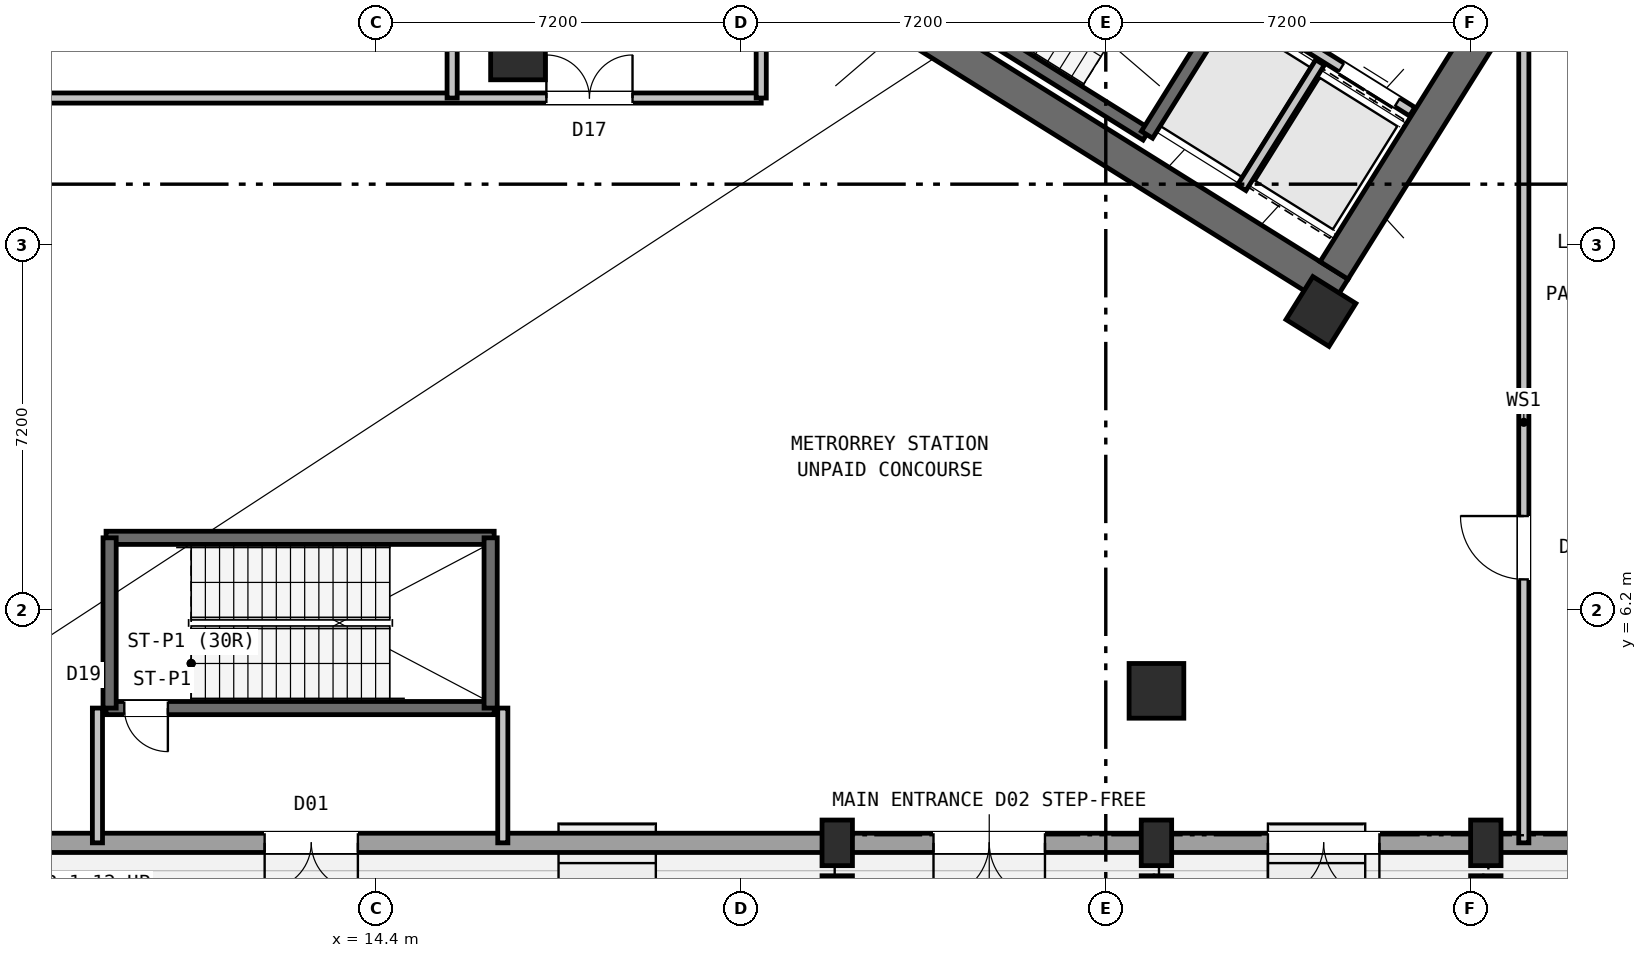
"""IFC4 building model, lengths in metres.
Left out: names, types, materials, properties, quantities, classifications, styles, units other than length and angle.
Written with IfcOpenShell. Run it as: python <this file> out.ifc"""

import sys

from ifc_helpers import new_model, si_unit, direction, frame, frame_2d, origin, origin_2d, place, context, subcontext, project, spatial, rectangle, hollow_rectangle, extrude, source, transform, mapped, element, fill, save


model = new_model("IFC4")
c1 = context("Model", 3, precision=1e-05, world=origin(), true_north=direction((0.0, 1.0)))
c2 = subcontext(c1, "Body", "Model", "MODEL_VIEW")
j1 = project(units=[si_unit("LENGTHUNIT", "METRE"), si_unit("PLANEANGLEUNIT", "RADIAN")], contexts=[c1])
p1 = place(None, origin())
s1 = spatial("IfcSite", under=j1, at=p1, CompositionType="ELEMENT")
p2 = place(p1, origin())
s2 = spatial("IfcBuilding", under=s1, at=p2, CompositionType="ELEMENT")
p3 = place(p2, origin())
s3 = spatial("IfcBuildingStorey", under=s2, at=p3, CompositionType="ELEMENT", Elevation=0.0)
p4 = place(p3, frame((33.409, 12.45, 0.0), z_axis=(0.0, 0.0, 1.0), x_axis=(-0.848051132073, 0.529914405721, 0.0)))
e1 = element("IfcWall", 1, at=p4, inside=s3, PredefinedType="SHEAR", context=c2, shape_type="SweptSolid", body=[
    extrude(rectangle(XDim=13.24, YDim=0.65, at=frame_2d((6.62, 0.0))), origin(), (0.0, 0.0, 1.0), 5.05),
])
p5 = place(p3, frame((36.683, 18.304, 0.0), z_axis=(0.0, 0.0, 1.0), x_axis=(-0.529899109053, -0.848060690178, 0.0)))
e2 = element("IfcWall", 2, at=p5, inside=s3, PredefinedType="SHEAR", context=c2, shape_type="SweptSolid", body=[
    extrude(rectangle(XDim=6.375, YDim=0.65, at=frame_2d((3.188, 0.0))), origin(), (0.0, 0.0, 1.0), 5.05),
])
m1 = source(origin(), c2, "Body", "SweptSolid", [
    extrude(hollow_rectangle(XDim=1.08, YDim=1.08, WallThickness=0.04, at=origin_2d()), origin(), (0.0, 0.0, 1.0), 5.4),
])
for number, where, z_axis, x_axis in (
    (3, (17.2, 17.2, 0.0), (0.0, 0.0, 1.0), (1.0, 0.0, 0.0)),
    (4, (29.8, 4.6, 0.0), (0.0, 0.0, 1.0), (1.0, 0.0, 0.0)),
):
    element("IfcColumn", number, at=place(p3, frame(where, z_axis=z_axis, x_axis=x_axis)), inside=s3, PredefinedType="COLUMN", context=c2, shape_type="MappedRepresentation", body=[
        mapped(m1, transform((0.0, 0.0, 0.0), scale=1.0)),
    ])
m2 = source(origin(), c2, "Body", "SweptSolid", [
    extrude(hollow_rectangle(XDim=1.0, YDim=1.0, WallThickness=0.04, at=origin_2d()), origin(), (0.0, 0.0, 1.0), 5.4),
])
p6 = place(p3, frame((33.046, 12.087, 0.0), z_axis=(0.0, 0.0, 1.0), x_axis=(-0.848048096156, 0.529919264233, 0.0)))
e5 = element("IfcColumn", 5, at=p6, inside=s3, PredefinedType="COLUMN", context=c2, shape_type="MappedRepresentation", body=[
    mapped(m2, transform((0.0, 0.0, 0.0), scale=1.0)),
])
m3 = source(origin(), c2, "Body", "SweptSolid", [
    extrude(rectangle(XDim=0.6, YDim=0.9, at=origin_2d()), origin(), (0.0, 0.0, 1.0), 4.34),
])
p7 = place(p3, frame((23.5, 0.5, -0.16), z_axis=(0.0, 0.0, 1.0), x_axis=(1.0, 0.0, 0.0)))
e6 = element("IfcColumn", 6, at=p7, inside=s3, PredefinedType="PILASTER", context=c2, shape_type="MappedRepresentation", body=[
    mapped(m3, transform((0.0, 0.0, 0.0), scale=1.0)),
])
m4 = source(origin(), c2, "Body", "SweptSolid", [
    extrude(rectangle(XDim=0.6, YDim=0.9, at=origin_2d()), origin(), (0.0, 0.0, 1.0), 4.53),
])
p8 = place(p3, frame((23.5, 1.6, -0.35), z_axis=(0.0, 0.0, 1.0), x_axis=(1.0, 0.0, 0.0)))
e7 = element("IfcColumn", 7, at=p8, inside=s3, PredefinedType="PILASTER", context=c2, shape_type="MappedRepresentation", body=[
    mapped(m4, transform((0.0, 0.0, 0.0), scale=1.0)),
])
p9 = place(p3, frame((29.8, 0.5, -0.16), z_axis=(0.0, 0.0, 1.0), x_axis=(1.0, 0.0, 0.0)))
e8 = element("IfcColumn", 8, at=p9, inside=s3, PredefinedType="PILASTER", context=c2, shape_type="MappedRepresentation", body=[
    mapped(m3, transform((0.0, 0.0, 0.0), scale=1.0)),
])
p10 = place(p3, frame((29.8, 1.6, -0.35), z_axis=(0.0, 0.0, 1.0), x_axis=(1.0, 0.0, 0.0)))
e9 = element("IfcColumn", 9, at=p10, inside=s3, PredefinedType="PILASTER", context=c2, shape_type="MappedRepresentation", body=[
    mapped(m4, transform((0.0, 0.0, 0.0), scale=1.0)),
])
p11 = place(p3, frame((36.3, 0.5, -0.16), z_axis=(0.0, 0.0, 1.0), x_axis=(1.0, 0.0, 0.0)))
e10 = element("IfcColumn", 10, at=p11, inside=s3, PredefinedType="PILASTER", context=c2, shape_type="MappedRepresentation", body=[
    mapped(m3, transform((0.0, 0.0, 0.0), scale=1.0)),
])
p12 = place(p3, frame((36.3, 1.6, -0.35), z_axis=(0.0, 0.0, 1.0), x_axis=(1.0, 0.0, 0.0)))
e11 = element("IfcColumn", 11, at=p12, inside=s3, PredefinedType="PILASTER", context=c2, shape_type="MappedRepresentation", body=[
    mapped(m4, transform((0.0, 0.0, 0.0), scale=1.0)),
])
p13 = place(p3, frame((67.117, 1.6, 0.0), z_axis=(0.0, 0.0, 1.0), x_axis=(-1.0, 0.0, 0.0)))
e12 = element("IfcWall", 12, at=p13, inside=s3, PredefinedType="STANDARD", context=c2, shape_type="SweptSolid", body=[
    extrude(rectangle(XDim=62.234, YDim=0.38, at=frame_2d((31.117, 0.0))), origin(), (0.0, 0.0, 1.0), 3.755),
])
p14 = place(p13, frame((53.077, 0.0, 0.0)))
e13 = element("IfcOpeningElement", 13, at=p14, cuts=e12, PredefinedType="OPENING", context=c2, shape_type="SweptSolid", body=[
    extrude(rectangle(XDim=1.84, YDim=2.4, at=frame_2d((0.92, 1.2))), frame((0.0, 0.2, 0.0), z_axis=(0.0, -1.0, 0.0), x_axis=(1.0, 0.0, 0.0)), (0.0, 0.0, 1.0), 0.4),
])
p15 = place(p13, frame((39.517, 0.0, 0.0)))
e14 = element("IfcOpeningElement", 14, at=p15, cuts=e12, PredefinedType="OPENING", context=c2, shape_type="SweptSolid", body=[
    extrude(rectangle(XDim=2.2, YDim=2.6, at=frame_2d((1.1, 1.3))), frame((0.0, 0.2, 0.0), z_axis=(0.0, -1.0, 0.0), x_axis=(1.0, 0.0, 0.0)), (0.0, 0.0, 1.0), 0.4),
])
p16 = place(p13, frame((32.917, 0.0, 0.0)))
e15 = element("IfcOpeningElement", 15, at=p16, cuts=e12, PredefinedType="OPENING", context=c2, shape_type="SweptSolid", body=[
    extrude(rectangle(XDim=2.2, YDim=2.6, at=frame_2d((1.1, 1.3))), frame((0.0, 0.2, 0.0), z_axis=(0.0, -1.0, 0.0), x_axis=(1.0, 0.0, 0.0)), (0.0, 0.0, 1.0), 0.4),
])
p17 = place(p13, frame((26.997, 0.0, 0.0)))
e16 = element("IfcOpeningElement", 16, at=p17, cuts=e12, PredefinedType="OPENING", context=c2, shape_type="SweptSolid", body=[
    extrude(rectangle(XDim=1.84, YDim=2.4, at=frame_2d((0.92, 1.2))), frame((0.0, 0.2, 0.0), z_axis=(0.0, -1.0, 0.0), x_axis=(1.0, 0.0, 0.0)), (0.0, 0.0, 1.0), 0.4),
])
p18 = place(p13, frame((21.017, 0.0, 0.0)))
e17 = element("IfcOpeningElement", 17, at=p18, cuts=e12, PredefinedType="OPENING", context=c2, shape_type="SweptSolid", body=[
    extrude(rectangle(XDim=2.2, YDim=2.6, at=frame_2d((1.1, 1.3))), frame((0.0, 0.2, 0.0), z_axis=(0.0, -1.0, 0.0), x_axis=(1.0, 0.0, 0.0)), (0.0, 0.0, 1.0), 0.4),
])
p19 = place(p13, frame((17.297, 0.0, 0.0)))
e18 = element("IfcOpeningElement", 18, at=p19, cuts=e12, PredefinedType="OPENING", context=c2, shape_type="SweptSolid", body=[
    extrude(rectangle(XDim=1.84, YDim=2.4, at=frame_2d((0.92, 1.2))), frame((0.0, 0.2, 0.0), z_axis=(0.0, -1.0, 0.0), x_axis=(1.0, 0.0, 0.0)), (0.0, 0.0, 1.0), 0.4),
])
p20 = place(p13, frame((12.567, 0.0, 0.0)))
e19 = element("IfcOpeningElement", 19, at=p20, cuts=e12, PredefinedType="OPENING", context=c2, shape_type="SweptSolid", body=[
    extrude(rectangle(XDim=2.2, YDim=2.6, at=frame_2d((1.1, 1.3))), frame((0.0, 0.2, 0.0), z_axis=(0.0, -1.0, 0.0), x_axis=(1.0, 0.0, 0.0)), (0.0, 0.0, 1.0), 0.4),
])
p21 = place(p13, frame((6.277, 0.0, 0.0)))
e20 = element("IfcOpeningElement", 20, at=p21, cuts=e12, PredefinedType="OPENING", context=c2, shape_type="SweptSolid", body=[
    extrude(rectangle(XDim=1.84, YDim=2.4, at=frame_2d((0.92, 1.2))), frame((0.0, 0.2, 0.0), z_axis=(0.0, -1.0, 0.0), x_axis=(1.0, 0.0, 0.0)), (0.0, 0.0, 1.0), 0.4),
])
p22 = place(p3, frame((29.605, 15.581, 0.0), z_axis=(0.0, 0.0, 1.0), x_axis=(-0.848036911448, 0.529937163087, 0.0)))
e21 = element("IfcWall", 21, at=p22, inside=s3, PredefinedType="SHEAR", context=c2, shape_type="SweptSolid", body=[
    extrude(rectangle(XDim=7.46, YDim=0.26, at=frame_2d((3.73, 0.0))), origin(), (0.0, 0.0, 1.0), 5.05),
])
p23 = place(p3, frame((31.288, 18.256, 0.0), z_axis=(0.0, 0.0, 1.0), x_axis=(-0.529943379326, -0.848033026897, 0.0)))
e22 = element("IfcWall", 22, at=p23, inside=s3, PredefinedType="SHEAR", context=c2, shape_type="SweptSolid", body=[
    extrude(rectangle(XDim=3.16, YDim=0.26, at=frame_2d((1.58, 0.0))), origin(), (0.0, 0.0, 1.0), 5.05),
])
p24 = place(p3, frame((34.848, 16.031, 0.0), z_axis=(0.0, 0.0, 1.0), x_axis=(-0.848044042236, 0.529925751807, 0.0)))
e23 = element("IfcWall", 23, at=p24, inside=s3, PredefinedType="STANDARD", context=c2, shape_type="SweptSolid", body=[
    extrude(rectangle(XDim=4.198, YDim=0.2, at=frame_2d((2.099, 0.0))), origin(), (0.0, 0.0, 1.0), 5.04),
])
p25 = place(p24, frame((0.348, 0.0, 0.0)))
e24 = element("IfcOpeningElement", 24, at=p25, cuts=e23, PredefinedType="OPENING", context=c2, shape_type="SweptSolid", body=[
    extrude(rectangle(XDim=1.3, YDim=2.2, at=frame_2d((0.65, 1.1))), frame((0.0, 0.11, 0.0), z_axis=(0.0, -1.0, 0.0), x_axis=(1.0, 0.0, 0.0)), (0.0, 0.0, 1.0), 0.22),
])
p26 = place(p24, frame((2.423, 0.0, 0.0)))
e25 = element("IfcOpeningElement", 25, at=p26, cuts=e23, PredefinedType="OPENING", context=c2, shape_type="SweptSolid", body=[
    extrude(rectangle(XDim=1.45, YDim=2.25, at=frame_2d((0.725, 1.125))), frame((0.0, 0.11, 0.0), z_axis=(0.0, -1.0, 0.0), x_axis=(1.0, 0.0, 0.0)), (0.0, 0.0, 1.0), 0.22),
])
p27 = place(p3, frame((33.029, 17.003, 0.0), z_axis=(0.0, 0.0, 1.0), x_axis=(-0.529916267533, -0.848049968695, 0.0)))
e26 = element("IfcWall", 26, at=p27, inside=s3, PredefinedType="STANDARD", context=c2, shape_type="SweptSolid", body=[
    extrude(rectangle(XDim=2.92, YDim=0.2, at=frame_2d((1.46, 0.0))), origin(), (0.0, 0.0, 1.0), 5.04),
])
p28 = place(p3, frame((9.07, 7.62, 0.0), z_axis=(0.0, 0.0, 1.0), x_axis=(1.0, 0.0, 0.0)))
e27 = element("IfcWall", 27, at=p28, inside=s3, PredefinedType="SHEAR", context=c2, shape_type="SweptSolid", body=[
    extrude(rectangle(XDim=7.66, YDim=0.26, at=frame_2d((3.83, 0.0))), origin(), (0.0, 0.0, 1.0), 5.2),
])
p29 = place(p3, frame((9.07, 4.26, 0.0), z_axis=(0.0, 0.0, 1.0), x_axis=(1.0, 0.0, 0.0)))
e28 = element("IfcWall", 28, at=p29, inside=s3, PredefinedType="SHEAR", context=c2, shape_type="SweptSolid", body=[
    extrude(rectangle(XDim=7.66, YDim=0.26, at=frame_2d((3.83, 0.0))), origin(), (0.0, 0.0, 1.0), 5.2),
])
p30 = place(p29, frame((0.36, 0.0, 0.0)))
e29 = element("IfcOpeningElement", 29, at=p30, cuts=e28, PredefinedType="OPENING", context=c2, shape_type="SweptSolid", body=[
    extrude(rectangle(XDim=0.86, YDim=2.05, at=frame_2d((0.43, 1.025))), frame((0.0, 0.14, 0.0), z_axis=(0.0, -1.0, 0.0), x_axis=(1.0, 0.0, 0.0)), (0.0, 0.0, 1.0), 0.28),
])
for number, where, z_axis, x_axis in (
    (30, (9.14, 4.26, 0.0), (0.0, 0.0, 1.0), (0.0, 1.0, 0.0)),
    (31, (16.66, 4.26, 0.0), (0.0, 0.0, 1.0), (0.0, 1.0, 0.0)),
):
    element("IfcWall", number, at=place(p3, frame(where, z_axis=z_axis, x_axis=x_axis)), inside=s3, PredefinedType="SHEAR", context=c2, shape_type="SweptSolid", body=[
        extrude(rectangle(XDim=3.36, YDim=0.26, at=frame_2d((1.68, 0.0))), origin(), (0.0, 0.0, 1.0), 5.2),
    ])
p31 = place(p3, frame((37.05, 1.6, 0.0), z_axis=(0.0, 0.0, 1.0), x_axis=(0.0, 1.0, 0.0)))
e32 = element("IfcWall", 32, at=p31, inside=s3, PredefinedType="STANDARD", context=c2, shape_type="SweptSolid", body=[
    extrude(rectangle(XDim=16.6, YDim=0.2, at=frame_2d((8.3, 0.0))), origin(), (0.0, 0.0, 1.0), 5.04),
])
p32 = place(p31, frame((5.2, 0.0, 0.0)))
e33 = element("IfcOpeningElement", 33, at=p32, cuts=e32, PredefinedType="OPENING", context=c2, shape_type="SweptSolid", body=[
    extrude(rectangle(XDim=1.25, YDim=2.15, at=frame_2d((0.625, 1.075))), frame((0.0, 0.11, 0.0), z_axis=(0.0, -1.0, 0.0), x_axis=(1.0, 0.0, 0.0)), (0.0, 0.0, 1.0), 0.22),
])
p33 = place(p3, frame((1.6, 16.3, 0.0), z_axis=(0.0, 0.0, 1.0), x_axis=(1.0, 0.0, 0.0)))
e34 = element("IfcWall", 34, at=p33, inside=s3, PredefinedType="STANDARD", context=c2, shape_type="SweptSolid", body=[
    extrude(rectangle(XDim=20.4, YDim=0.2, at=frame_2d((10.2, 0.0))), origin(), (0.0, 0.0, 1.0), 5.04),
])
p34 = place(p33, frame((16.16, 0.0, 0.0)))
e35 = element("IfcOpeningElement", 35, at=p34, cuts=e34, PredefinedType="OPENING", context=c2, shape_type="SweptSolid", body=[
    extrude(rectangle(XDim=1.7, YDim=2.2, at=frame_2d((0.85, 1.1))), frame((0.0, 0.11, 0.0), z_axis=(0.0, -1.0, 0.0), x_axis=(1.0, 0.0, 0.0)), (0.0, 0.0, 1.0), 0.22),
])
p35 = place(p3, frame((15.9, 16.3, 0.0), z_axis=(0.0, 0.0, 1.0), x_axis=(0.0, 1.0, 0.0)))
e36 = element("IfcWall", 36, at=p35, inside=s3, PredefinedType="STANDARD", context=c2, shape_type="SweptSolid", body=[
    extrude(rectangle(XDim=11.8, YDim=0.2, at=frame_2d((5.9, 0.0))), origin(), (0.0, 0.0, 1.0), 5.04),
])
p36 = place(p35, frame((1.6, 0.0, 0.0)))
e37 = element("IfcOpeningElement", 37, at=p36, cuts=e36, PredefinedType="OPENING", context=c2, shape_type="SweptSolid", body=[
    extrude(rectangle(XDim=1.15, YDim=2.1, at=frame_2d((0.575, 1.05))), frame((0.0, 0.11, 0.0), z_axis=(0.0, -1.0, 0.0), x_axis=(1.0, 0.0, 0.0)), (0.0, 0.0, 1.0), 0.22),
])
p37 = place(p35, frame((7.0, 0.0, 0.0)))
e38 = element("IfcOpeningElement", 38, at=p37, cuts=e36, PredefinedType="OPENING", context=c2, shape_type="SweptSolid", body=[
    extrude(rectangle(XDim=1.4, YDim=2.15, at=frame_2d((0.7, 1.075))), frame((0.0, 0.11, 0.0), z_axis=(0.0, -1.0, 0.0), x_axis=(1.0, 0.0, 0.0)), (0.0, 0.0, 1.0), 0.22),
])
p38 = place(p3, frame((22.0, 16.3, 0.0), z_axis=(0.0, 0.0, 1.0), x_axis=(0.0, 1.0, 0.0)))
e39 = element("IfcWall", 39, at=p38, inside=s3, PredefinedType="STANDARD", context=c2, shape_type="SweptSolid", body=[
    extrude(rectangle(XDim=2.085, YDim=0.2, at=frame_2d((1.043, 0.0))), origin(), (0.0, 0.0, 1.0), 5.04),
])
for number, where, z_axis, x_axis in (
    (40, (8.9, 1.6, 0.0), (0.0, 0.0, 1.0), (0.0, 1.0, 0.0)),
    (41, (16.9, 1.6, 0.0), (0.0, 0.0, 1.0), (0.0, 1.0, 0.0)),
):
    element("IfcWall", number, at=place(p3, frame(where, z_axis=z_axis, x_axis=x_axis)), inside=s3, PredefinedType="STANDARD", context=c2, shape_type="SweptSolid", body=[
        extrude(rectangle(XDim=2.66, YDim=0.2, at=frame_2d((1.33, 0.0))), origin(), (0.0, 0.0, 1.0), 5.04),
    ])
m5 = source(origin(), c2, "Body", "SweptSolid", [
    extrude(rectangle(XDim=1.84, YDim=2.4, at=frame_2d((0.92, 1.2))), frame((0.0, 0.025, 0.0), z_axis=(0.0, -1.0, 0.0), x_axis=(1.0, 0.0, 0.0)), (0.0, 0.0, 1.0), 0.05),
])
p39 = place(p14, origin())
e42 = element("IfcDoor", 42, at=p39, inside=s3, OperationType="DOUBLE_DOOR_SINGLE_SWING", PredefinedType="DOOR", context=c2, shape_type="MappedRepresentation", body=[
    mapped(m5, transform((0.0, 0.0, 0.0), scale=1.0)),
])
fill(e13, e42)
m6 = source(origin(), c2, "Body", "SweptSolid", [
    extrude(rectangle(XDim=2.2, YDim=2.6, at=frame_2d((1.1, 1.3))), frame((0.0, 0.025, 0.0), z_axis=(0.0, -1.0, 0.0), x_axis=(1.0, 0.0, 0.0)), (0.0, 0.0, 1.0), 0.05),
])
p40 = place(p15, origin())
e43 = element("IfcDoor", 43, at=p40, inside=s3, OperationType="DOUBLE_DOOR_SINGLE_SWING", PredefinedType="DOOR", context=c2, shape_type="MappedRepresentation", body=[
    mapped(m6, transform((0.0, 0.0, 0.0), scale=1.0)),
])
fill(e14, e43)
p41 = place(p16, origin())
e44 = element("IfcDoor", 44, at=p41, inside=s3, OperationType="DOUBLE_DOOR_SINGLE_SWING", PredefinedType="DOOR", context=c2, shape_type="MappedRepresentation", body=[
    mapped(m6, transform((0.0, 0.0, 0.0), scale=1.0)),
])
fill(e15, e44)
m7 = source(origin(), c2, "Body", "SweptSolid", [
    extrude(rectangle(XDim=1.3, YDim=2.2, at=frame_2d((0.65, 1.1))), frame((0.0, 0.025, 0.0), z_axis=(0.0, -1.0, 0.0), x_axis=(1.0, 0.0, 0.0)), (0.0, 0.0, 1.0), 0.05),
])
p42 = place(p25, origin())
e45 = element("IfcDoor", 45, at=p42, inside=s3, OperationType="DOUBLE_DOOR_SLIDING", PredefinedType="DOOR", context=c2, shape_type="MappedRepresentation", body=[
    mapped(m7, transform((0.0, 0.0, 0.0), scale=1.0)),
])
fill(e24, e45)
m8 = source(origin(), c2, "Body", "SweptSolid", [
    extrude(rectangle(XDim=1.25, YDim=2.15, at=frame_2d((0.625, 1.075))), frame((0.0, 0.025, 0.0), z_axis=(0.0, -1.0, 0.0), x_axis=(1.0, 0.0, 0.0)), (0.0, 0.0, 1.0), 0.05),
])
p43 = place(p32, origin())
e46 = element("IfcDoor", 46, at=p43, inside=s3, OperationType="SINGLE_SWING_RIGHT", PredefinedType="DOOR", context=c2, shape_type="MappedRepresentation", body=[
    mapped(m8, transform((0.0, 0.0, 0.0), scale=1.0)),
])
fill(e33, e46)
m9 = source(origin(), c2, "Body", "SweptSolid", [
    extrude(rectangle(XDim=1.7, YDim=2.2, at=frame_2d((0.85, 1.1))), frame((0.0, 0.025, 0.0), z_axis=(0.0, -1.0, 0.0), x_axis=(1.0, 0.0, 0.0)), (0.0, 0.0, 1.0), 0.05),
])
p44 = place(p34, origin())
e47 = element("IfcDoor", 47, at=p44, inside=s3, OperationType="DOUBLE_DOOR_SINGLE_SWING", PredefinedType="DOOR", context=c2, shape_type="MappedRepresentation", body=[
    mapped(m9, transform((0.0, 0.0, 0.0), scale=1.0)),
])
fill(e35, e47)
m10 = source(origin(), c2, "Body", "SweptSolid", [
    extrude(rectangle(XDim=0.86, YDim=2.05, at=frame_2d((0.43, 1.025))), frame((0.0, 0.025, 0.0), z_axis=(0.0, -1.0, 0.0), x_axis=(1.0, 0.0, 0.0)), (0.0, 0.0, 1.0), 0.05),
])
p45 = place(p30, frame((0.86, 0.0, 0.0), z_axis=(0.0, 0.0, 1.0), x_axis=(-1.0, 0.0, 0.0)))
e48 = element("IfcDoor", 48, at=p45, inside=s3, OperationType="SINGLE_SWING_LEFT", PredefinedType="DOOR", context=c2, shape_type="MappedRepresentation", body=[
    mapped(m10, transform((0.0, 0.0, 0.0), scale=1.0)),
])
fill(e29, e48)
save(model, sys.argv[1])
